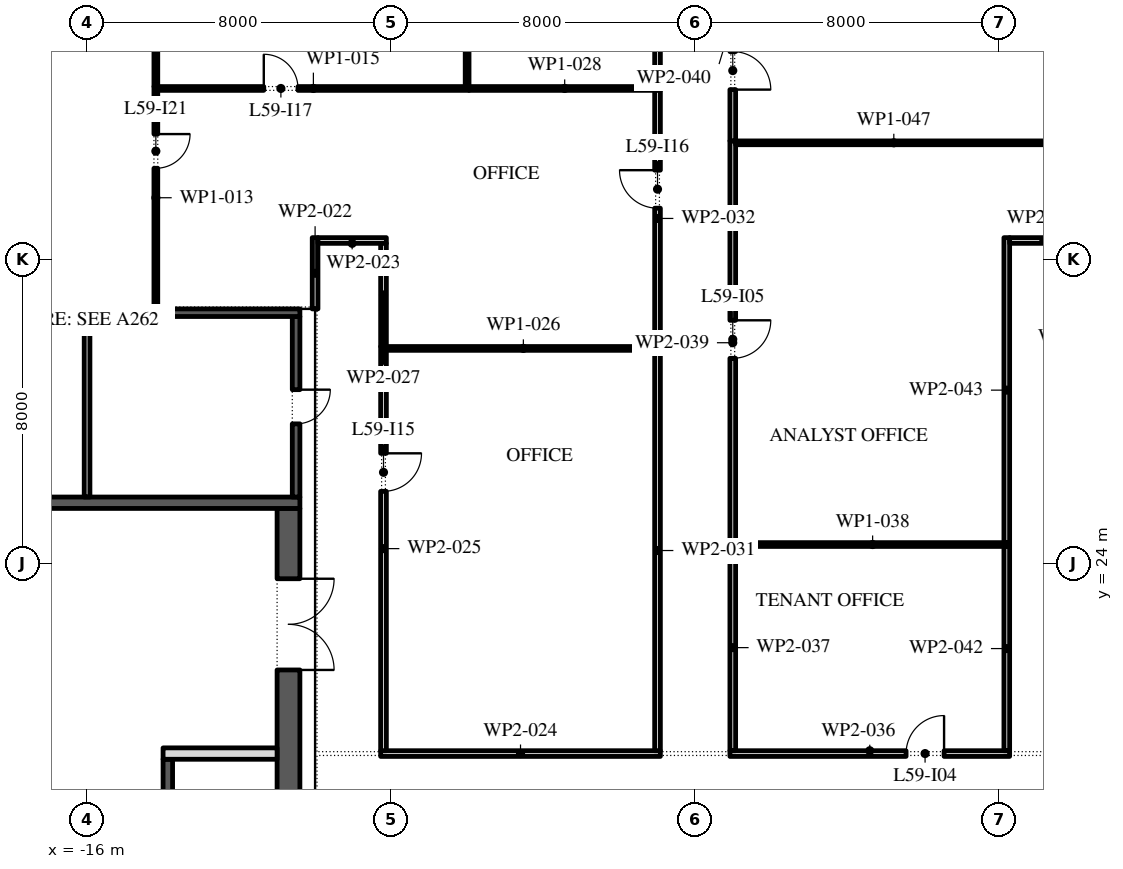
"""IFC4 building model, lengths in metres.
Left out: names, types, materials, properties, quantities, classifications, styles, units other than length and angle.
Written with IfcOpenShell. Run it as: python <this file> out.ifc"""

import sys

from ifc_helpers import new_model, si_unit, direction, frame, frame_2d, origin, place, context, subcontext, project, spatial, rectangle, extrude, element, fill, save


model = new_model("IFC4")
c1 = context("Model", 3, precision=1e-05, world=origin(), true_north=direction((0.0, 1.0)))
c2 = subcontext(c1, "Body", "Model", "MODEL_VIEW")
j1 = project(units=[si_unit("LENGTHUNIT", "METRE"), si_unit("PLANEANGLEUNIT", "RADIAN")], contexts=[c1])
p1 = place(None, origin())
s1 = spatial("IfcSite", under=j1, at=p1, CompositionType="ELEMENT")
p2 = place(p1, origin())
s2 = spatial("IfcBuilding", under=s1, at=p2, CompositionType="ELEMENT")
p3 = place(p2, frame((0.0, 0.0, 272.4)))
s3 = spatial("IfcBuildingStorey", under=s2, at=p3, CompositionType="ELEMENT", Elevation=272.4)
p4 = place(p3, frame((-10.7, -2.45, 0.0), z_axis=(0.0, 0.0, 1.0), x_axis=(0.0, 1.0, 0.0)))
e1 = element("IfcWall", 1, at=p4, inside=s3, PredefinedType="SHEAR", context=c2, shape_type="SweptSolid", body=[
    extrude(rectangle(XDim=27.9, YDim=0.6, at=frame_2d((13.95, 0.0))), origin(), (0.0, 0.0, 1.0), 4.0),
])
p5 = place(p4, frame((23.65, 0.0, 0.0)))
e2 = element("IfcOpeningElement", 2, at=p5, cuts=e1, PredefinedType="OPENING", context=c2, shape_type="SweptSolid", body=[
    extrude(rectangle(XDim=2.4, YDim=2.1, at=frame_2d((1.2, 1.05))), frame((0.0, 0.31, 0.0), z_axis=(0.0, -1.0, 0.0), x_axis=(1.0, 0.0, 0.0)), (0.0, 0.0, 1.0), 0.62),
])
p6 = place(p4, frame((1.087, 0.0, 0.0)))
e3 = element("IfcOpeningElement", 3, at=p6, cuts=e1, PredefinedType="OPENING", context=c2, shape_type="SweptSolid", body=[
    extrude(rectangle(XDim=0.9, YDim=2.1, at=frame_2d((0.45, 1.05))), frame((0.0, 0.31, 0.0), z_axis=(0.0, -1.0, 0.0), x_axis=(1.0, 0.0, 0.0)), (0.0, 0.0, 1.0), 0.62),
])
p7 = place(p4, frame((4.262, 0.0, 0.0)))
e4 = element("IfcOpeningElement", 4, at=p7, cuts=e1, PredefinedType="OPENING", context=c2, shape_type="SweptSolid", body=[
    extrude(rectangle(XDim=1.0, YDim=2.1, at=frame_2d((0.5, 1.05))), frame((0.0, 0.31, 0.0), z_axis=(0.0, -1.0, 0.0), x_axis=(1.0, 0.0, 0.0)), (0.0, 0.0, 1.0), 0.62),
])
p8 = place(p3, frame((-21.6, 25.6, 0.0), z_axis=(0.0, 0.0, 1.0), x_axis=(1.0, 0.0, 0.0)))
e5 = element("IfcWall", 5, at=p8, inside=s3, PredefinedType="SHEAR", context=c2, shape_type="SweptSolid", body=[
    extrude(rectangle(XDim=11.2, YDim=0.3, at=frame_2d((5.6, 0.0))), origin(), (0.0, 0.0, 1.0), 4.0),
])
p9 = place(p3, frame((-13.875, -2.45, 0.0), z_axis=(0.0, 0.0, 1.0), x_axis=(0.0, 1.0, 0.0)))
e6 = element("IfcWall", 6, at=p9, inside=s3, PredefinedType="SHEAR", context=c2, shape_type="SweptSolid", body=[
    extrude(rectangle(XDim=21.3, YDim=0.25, at=frame_2d((10.65, 0.0))), origin(), (0.0, 0.0, 1.0), 4.0),
])
p10 = place(p9, frame((16.261, 0.0, 0.0)))
e7 = element("IfcOpeningElement", 7, at=p10, cuts=e6, PredefinedType="OPENING", context=c2, shape_type="SweptSolid", body=[
    extrude(rectangle(XDim=0.9, YDim=2.1, at=frame_2d((0.45, 1.05))), frame((0.0, 0.135, 0.0), z_axis=(0.0, -1.0, 0.0), x_axis=(1.0, 0.0, 0.0)), (0.0, 0.0, 1.0), 0.27),
])
p11 = place(p9, frame((19.325, 0.0, 0.0)))
e8 = element("IfcOpeningElement", 8, at=p11, cuts=e6, PredefinedType="OPENING", context=c2, shape_type="SweptSolid", body=[
    extrude(rectangle(XDim=0.9, YDim=2.1, at=frame_2d((0.45, 1.05))), frame((0.0, 0.135, 0.0), z_axis=(0.0, -1.0, 0.0), x_axis=(1.0, 0.0, 0.0)), (0.0, 0.0, 1.0), 0.27),
])
p12 = place(p9, frame((6.971, 0.0, 0.0)))
e9 = element("IfcOpeningElement", 9, at=p12, cuts=e6, PredefinedType="OPENING", context=c2, shape_type="SweptSolid", body=[
    extrude(rectangle(XDim=1.1, YDim=2.1, at=frame_2d((0.55, 1.05))), frame((0.0, 0.135, 0.0), z_axis=(0.0, -1.0, 0.0), x_axis=(1.0, 0.0, 0.0)), (0.0, 0.0, 1.0), 0.27),
])
p13 = place(p9, frame((9.114, 0.0, 0.0)))
e10 = element("IfcOpeningElement", 10, at=p13, cuts=e6, PredefinedType="OPENING", context=c2, shape_type="SweptSolid", body=[
    extrude(rectangle(XDim=1.1, YDim=2.1, at=frame_2d((0.55, 1.05))), frame((0.0, 0.135, 0.0), z_axis=(0.0, -1.0, 0.0), x_axis=(1.0, 0.0, 0.0)), (0.0, 0.0, 1.0), 0.27),
])
p14 = place(p9, frame((11.257, 0.0, 0.0)))
e11 = element("IfcOpeningElement", 11, at=p14, cuts=e6, PredefinedType="OPENING", context=c2, shape_type="SweptSolid", body=[
    extrude(rectangle(XDim=1.1, YDim=2.1, at=frame_2d((0.55, 1.05))), frame((0.0, 0.135, 0.0), z_axis=(0.0, -1.0, 0.0), x_axis=(1.0, 0.0, 0.0)), (0.0, 0.0, 1.0), 0.27),
])
p15 = place(p9, frame((13.4, 0.0, 0.0)))
e12 = element("IfcOpeningElement", 12, at=p15, cuts=e6, PredefinedType="OPENING", context=c2, shape_type="SweptSolid", body=[
    extrude(rectangle(XDim=1.1, YDim=2.1, at=frame_2d((0.55, 1.05))), frame((0.0, 0.135, 0.0), z_axis=(0.0, -1.0, 0.0), x_axis=(1.0, 0.0, 0.0)), (0.0, 0.0, 1.0), 0.27),
])
p16 = place(p3, frame((-14.0, 19.0, 0.0), z_axis=(0.0, 0.0, 1.0), x_axis=(1.0, 0.0, 0.0)))
e13 = element("IfcWall", 13, at=p16, inside=s3, PredefinedType="PARTITIONING", context=c2, shape_type="SweptSolid", body=[
    extrude(rectangle(XDim=3.0, YDim=0.3, at=frame_2d((1.5, 0.0))), origin(), (0.0, 0.0, 1.0), 4.0),
])
p17 = place(p3, frame((-10.5, 25.75, 0.0), z_axis=(0.0, 0.0, 1.0), x_axis=(0.0, 1.0, 0.0)))
e14 = element("IfcWall", 14, at=p17, inside=s3, PredefinedType="SHEAR", context=c2, shape_type="SweptSolid", body=[
    extrude(rectangle(XDim=4.75, YDim=0.2, at=frame_2d((2.375, 0.0))), origin(), (0.0, 0.0, 1.0), 4.0),
])
p18 = place(p17, frame((1.925, 0.0, 0.0)))
e15 = element("IfcOpeningElement", 15, at=p18, cuts=e14, PredefinedType="OPENING", context=c2, shape_type="SweptSolid", body=[
    extrude(rectangle(XDim=0.9, YDim=2.1, at=frame_2d((0.45, 1.05))), frame((0.0, 0.11, 0.0), z_axis=(0.0, -1.0, 0.0), x_axis=(1.0, 0.0, 0.0)), (0.0, 0.0, 1.0), 0.22),
])
p19 = place(p3, frame((-21.6, 30.6, 0.0), z_axis=(0.0, 0.0, 1.0), x_axis=(1.0, 0.0, 0.0)))
e16 = element("IfcWall", 16, at=p19, inside=s3, PredefinedType="SHEAR", context=c2, shape_type="SweptSolid", body=[
    extrude(rectangle(XDim=11.2, YDim=0.2, at=frame_2d((5.6, 0.0))), origin(), (0.0, 0.0, 1.0), 4.0),
])
p20 = place(p3, frame((-16.0, 25.75, 0.0), z_axis=(0.0, 0.0, 1.0), x_axis=(0.0, 1.0, 0.0)))
e17 = element("IfcWall", 17, at=p20, inside=s3, PredefinedType="PARTITIONING", context=c2, shape_type="SweptSolid", body=[
    extrude(rectangle(XDim=4.75, YDim=0.15, at=frame_2d((2.375, 0.0))), origin(), (0.0, 0.0, 1.0), 4.0),
])
p21 = place(p3, frame((-14.19, 30.7, 0.0), z_axis=(0.0, 0.0, 1.0), x_axis=(0.0, 1.0, 0.0)))
e18 = element("IfcWall", 18, at=p21, inside=s3, PredefinedType="PARTITIONING", context=c2, shape_type="SweptSolid", body=[
    extrude(rectangle(XDim=5.85, YDim=0.1, at=frame_2d((2.925, 0.0))), origin(), (0.0, 0.0, 1.0), 4.0),
])
p22 = place(p21, frame((3.7, 0.0, 0.0)))
e19 = element("IfcOpeningElement", 19, at=p22, cuts=e18, PredefinedType="OPENING", context=c2, shape_type="SweptSolid", body=[
    extrude(rectangle(XDim=0.9, YDim=2.1, at=frame_2d((0.45, 1.05))), frame((0.0, 0.06, 0.0), z_axis=(0.0, -1.0, 0.0), x_axis=(1.0, 0.0, 0.0)), (0.0, 0.0, 1.0), 0.12),
])
p23 = place(p3, frame((-14.19, 36.55, 0.0), z_axis=(0.0, 0.0, 1.0), x_axis=(0.0, 1.0, 0.0)))
e20 = element("IfcWall", 20, at=p23, inside=s3, PredefinedType="PARTITIONING", context=c2, shape_type="SweptSolid", body=[
    extrude(rectangle(XDim=5.5, YDim=0.1, at=frame_2d((2.75, 0.0))), origin(), (0.0, 0.0, 1.0), 4.0),
])
p24 = place(p3, frame((-14.14, 36.5, 0.0), z_axis=(0.0, 0.0, 1.0), x_axis=(1.0, 0.0, 0.0)))
e21 = element("IfcWall", 21, at=p24, inside=s3, PredefinedType="PARTITIONING", context=c2, shape_type="SweptSolid", body=[
    extrude(rectangle(XDim=8.19, YDim=0.1, at=frame_2d((4.095, 0.0))), origin(), (0.0, 0.0, 1.0), 4.0),
])
p25 = place(p24, frame((2.79, 0.0, 0.0)))
e22 = element("IfcOpeningElement", 22, at=p25, cuts=e21, PredefinedType="OPENING", context=c2, shape_type="SweptSolid", body=[
    extrude(rectangle(XDim=0.9, YDim=2.1, at=frame_2d((0.45, 1.05))), frame((0.0, 0.06, 0.0), z_axis=(0.0, -1.0, 0.0), x_axis=(1.0, 0.0, 0.0)), (0.0, 0.0, 1.0), 0.12),
])
p26 = place(p3, frame((-10.0, 30.7, 0.0), z_axis=(0.0, 0.0, 1.0), x_axis=(0.0, 1.0, 0.0)))
e23 = element("IfcWall", 23, at=p26, inside=s3, PredefinedType="PARTITIONING", context=c2, shape_type="SweptSolid", body=[
    extrude(rectangle(XDim=1.875, YDim=0.15, at=frame_2d((0.938, 0.0))), origin(), (0.0, 0.0, 1.0), 4.0),
])
p27 = place(p3, frame((-9.925, 32.5, 0.0), z_axis=(0.0, 0.0, 1.0), x_axis=(1.0, 0.0, 0.0)))
e24 = element("IfcWall", 24, at=p27, inside=s3, PredefinedType="PARTITIONING", context=c2, shape_type="SweptSolid", body=[
    extrude(rectangle(XDim=1.8, YDim=0.15, at=frame_2d((0.9, 0.0))), origin(), (0.0, 0.0, 1.0), 4.0),
])
p28 = place(p3, frame((-8.275, 19.0, 0.0), z_axis=(0.0, 0.0, 1.0), x_axis=(1.0, 0.0, 0.0)))
e25 = element("IfcWall", 25, at=p28, inside=s3, PredefinedType="PARTITIONING", context=c2, shape_type="SweptSolid", body=[
    extrude(rectangle(XDim=7.36, YDim=0.15, at=frame_2d((3.68, 0.0))), origin(), (0.0, 0.0, 1.0), 4.0),
])
p29 = place(p3, frame((-8.2, 29.71, 0.0), z_axis=(0.0, 0.0, 1.0), x_axis=(0.0, -1.0, 0.0)))
e26 = element("IfcWall", 26, at=p29, inside=s3, PredefinedType="PARTITIONING", context=c2, shape_type="SweptSolid", body=[
    extrude(rectangle(XDim=10.635, YDim=0.15, at=frame_2d((5.317, 0.0))), origin(), (0.0, 0.0, 1.0), 4.0),
])
p30 = place(p29, frame((2.81, 0.0, 0.0)))
e27 = element("IfcOpeningElement", 27, at=p30, cuts=e26, PredefinedType="OPENING", context=c2, shape_type="SweptSolid", body=[
    extrude(rectangle(XDim=1.0, YDim=2.1, at=frame_2d((0.5, 1.05))), frame((0.0, 0.085, 0.0), z_axis=(0.0, -1.0, 0.0), x_axis=(1.0, 0.0, 0.0)), (0.0, 0.0, 1.0), 0.17),
])
p31 = place(p3, frame((-8.125, 29.66, 0.0), z_axis=(0.0, 0.0, 1.0), x_axis=(1.0, 0.0, 0.0)))
e28 = element("IfcWall", 28, at=p31, inside=s3, PredefinedType="PARTITIONING", context=c2, shape_type="SweptSolid", body=[
    extrude(rectangle(XDim=7.21, YDim=0.1, at=frame_2d((3.605, 0.0))), origin(), (0.0, 0.0, 1.0), 4.0),
])
p32 = place(p3, frame((-8.2, 32.425, 0.0), z_axis=(0.0, 0.0, 1.0), x_axis=(0.0, -1.0, 0.0)))
e29 = element("IfcWall", 29, at=p32, inside=s3, PredefinedType="PARTITIONING", context=c2, shape_type="SweptSolid", body=[
    extrude(rectangle(XDim=2.715, YDim=0.15, at=frame_2d((1.357, 0.0))), origin(), (0.0, 0.0, 1.0), 4.0),
])
p33 = place(p3, frame((-5.95, 36.5, 0.0), z_axis=(0.0, 0.0, 1.0), x_axis=(1.0, 0.0, 0.0)))
e30 = element("IfcWall", 30, at=p33, inside=s3, PredefinedType="PARTITIONING", context=c2, shape_type="SweptSolid", body=[
    extrude(rectangle(XDim=5.035, YDim=0.1, at=frame_2d((2.518, 0.0))), origin(), (0.0, 0.0, 1.0), 4.0),
])
p34 = place(p3, frame((-6.0, 43.45, 0.0), z_axis=(0.0, 0.0, 1.0), x_axis=(0.0, -1.0, 0.0)))
e31 = element("IfcWall", 31, at=p34, inside=s3, PredefinedType="PARTITIONING", context=c2, shape_type="SweptSolid", body=[
    extrude(rectangle(XDim=6.9, YDim=0.1, at=frame_2d((3.45, 0.0))), origin(), (0.0, 0.0, 1.0), 4.0),
])
p35 = place(p3, frame((-0.99, 19.075, 0.0), z_axis=(0.0, 0.0, 1.0), x_axis=(0.0, 1.0, 0.0)))
e32 = element("IfcWall", 32, at=p35, inside=s3, PredefinedType="PARTITIONING", context=c2, shape_type="SweptSolid", body=[
    extrude(rectangle(XDim=10.535, YDim=0.15, at=frame_2d((5.268, 0.0))), origin(), (0.0, 0.0, 1.0), 4.0),
])
p36 = place(p3, frame((-0.99, 29.71, 0.0), z_axis=(0.0, 0.0, 1.0), x_axis=(0.0, 1.0, 0.0)))
e33 = element("IfcWall", 33, at=p36, inside=s3, PredefinedType="PARTITIONING", context=c2, shape_type="SweptSolid", body=[
    extrude(rectangle(XDim=6.74, YDim=0.15, at=frame_2d((3.37, 0.0))), origin(), (0.0, 0.0, 1.0), 4.0),
])
p37 = place(p36, frame((3.64, 0.0, 0.0)))
e34 = element("IfcOpeningElement", 34, at=p37, cuts=e33, PredefinedType="OPENING", context=c2, shape_type="SweptSolid", body=[
    extrude(rectangle(XDim=1.0, YDim=2.1, at=frame_2d((0.5, 1.05))), frame((0.0, 0.085, 0.0), z_axis=(0.0, -1.0, 0.0), x_axis=(1.0, 0.0, 0.0)), (0.0, 0.0, 1.0), 0.17),
])
p38 = place(p3, frame((-0.99, 36.55, 0.0), z_axis=(0.0, 0.0, 1.0), x_axis=(0.0, 1.0, 0.0)))
e35 = element("IfcWall", 35, at=p38, inside=s3, PredefinedType="PARTITIONING", context=c2, shape_type="SweptSolid", body=[
    extrude(rectangle(XDim=6.9, YDim=0.15, at=frame_2d((3.45, 0.0))), origin(), (0.0, 0.0, 1.0), 4.0),
])
p39 = place(p38, frame((4.3, 0.0, 0.0)))
e36 = element("IfcOpeningElement", 36, at=p39, cuts=e35, PredefinedType="OPENING", context=c2, shape_type="SweptSolid", body=[
    extrude(rectangle(XDim=1.0, YDim=2.1, at=frame_2d((0.5, 1.05))), frame((0.0, 0.085, 0.0), z_axis=(0.0, -1.0, 0.0), x_axis=(1.0, 0.0, 0.0)), (0.0, 0.0, 1.0), 0.17),
])
p40 = place(p3, frame((0.915, 19.0, 0.0), z_axis=(0.0, 0.0, 1.0), x_axis=(1.0, 0.0, 0.0)))
e37 = element("IfcWall", 37, at=p40, inside=s3, PredefinedType="PARTITIONING", context=c2, shape_type="SweptSolid", body=[
    extrude(rectangle(XDim=7.36, YDim=0.15, at=frame_2d((3.68, 0.0))), origin(), (0.0, 0.0, 1.0), 4.0),
])
p41 = place(p40, frame((4.635, 0.0, 0.0)))
e38 = element("IfcOpeningElement", 38, at=p41, cuts=e37, PredefinedType="OPENING", context=c2, shape_type="SweptSolid", body=[
    extrude(rectangle(XDim=1.0, YDim=2.1, at=frame_2d((0.5, 1.05))), frame((0.0, 0.085, 0.0), z_axis=(0.0, -1.0, 0.0), x_axis=(1.0, 0.0, 0.0)), (0.0, 0.0, 1.0), 0.17),
])
p42 = place(p3, frame((0.99, 24.5, 0.0), z_axis=(0.0, 0.0, 1.0), x_axis=(0.0, -1.0, 0.0)))
e39 = element("IfcWall", 39, at=p42, inside=s3, PredefinedType="PARTITIONING", context=c2, shape_type="SweptSolid", body=[
    extrude(rectangle(XDim=5.425, YDim=0.15, at=frame_2d((2.712, 0.0))), origin(), (0.0, 0.0, 1.0), 4.0),
])
p43 = place(p3, frame((1.065, 24.5, 0.0), z_axis=(0.0, 0.0, 1.0), x_axis=(1.0, 0.0, 0.0)))
e40 = element("IfcWall", 40, at=p43, inside=s3, PredefinedType="PARTITIONING", context=c2, shape_type="SweptSolid", body=[
    extrude(rectangle(XDim=7.21, YDim=0.1, at=frame_2d((3.605, 0.0))), origin(), (0.0, 0.0, 1.0), 4.0),
])
p44 = place(p3, frame((0.99, 35.12, 0.0), z_axis=(0.0, 0.0, 1.0), x_axis=(0.0, -1.0, 0.0)))
e41 = element("IfcWall", 41, at=p44, inside=s3, PredefinedType="PARTITIONING", context=c2, shape_type="SweptSolid", body=[
    extrude(rectangle(XDim=10.62, YDim=0.15, at=frame_2d((5.31, 0.0))), origin(), (0.0, 0.0, 1.0), 4.0),
])
p45 = place(p44, frame((4.72, 0.0, 0.0)))
e42 = element("IfcOpeningElement", 42, at=p45, cuts=e41, PredefinedType="OPENING", context=c2, shape_type="SweptSolid", body=[
    extrude(rectangle(XDim=1.0, YDim=2.1, at=frame_2d((0.5, 1.05))), frame((0.0, 0.085, 0.0), z_axis=(0.0, -1.0, 0.0), x_axis=(1.0, 0.0, 0.0)), (0.0, 0.0, 1.0), 0.17),
])
p46 = place(p3, frame((0.99, 41.55, 0.0), z_axis=(0.0, 0.0, 1.0), x_axis=(0.0, -1.0, 0.0)))
e43 = element("IfcWall", 43, at=p46, inside=s3, PredefinedType="PARTITIONING", context=c2, shape_type="SweptSolid", body=[
    extrude(rectangle(XDim=6.43, YDim=0.15, at=frame_2d((3.215, 0.0))), origin(), (0.0, 0.0, 1.0), 4.0),
])
p47 = place(p46, frame((4.08, 0.0, 0.0)))
e44 = element("IfcOpeningElement", 44, at=p47, cuts=e43, PredefinedType="OPENING", context=c2, shape_type="SweptSolid", body=[
    extrude(rectangle(XDim=1.0, YDim=2.1, at=frame_2d((0.5, 1.05))), frame((0.0, 0.085, 0.0), z_axis=(0.0, -1.0, 0.0), x_axis=(1.0, 0.0, 0.0)), (0.0, 0.0, 1.0), 0.17),
])
p48 = place(p3, frame((8.2, 19.075, 0.0), z_axis=(0.0, 0.0, 1.0), x_axis=(0.0, 1.0, 0.0)))
e45 = element("IfcWall", 45, at=p48, inside=s3, PredefinedType="PARTITIONING", context=c2, shape_type="SweptSolid", body=[
    extrude(rectangle(XDim=5.375, YDim=0.15, at=frame_2d((2.688, 0.0))), origin(), (0.0, 0.0, 1.0), 4.0),
])
p49 = place(p3, frame((8.2, 24.55, 0.0), z_axis=(0.0, 0.0, 1.0), x_axis=(0.0, 1.0, 0.0)))
e46 = element("IfcWall", 46, at=p49, inside=s3, PredefinedType="PARTITIONING", context=c2, shape_type="SweptSolid", body=[
    extrude(rectangle(XDim=8.025, YDim=0.15, at=frame_2d((4.012, 0.0))), origin(), (0.0, 0.0, 1.0), 4.0),
])
p50 = place(p3, frame((8.275, 32.5, 0.0), z_axis=(0.0, 0.0, 1.0), x_axis=(1.0, 0.0, 0.0)))
e47 = element("IfcWall", 47, at=p50, inside=s3, PredefinedType="PARTITIONING", context=c2, shape_type="SweptSolid", body=[
    extrude(rectangle(XDim=1.8, YDim=0.15, at=frame_2d((0.9, 0.0))), origin(), (0.0, 0.0, 1.0), 4.0),
])
p51 = place(p3, frame((9.39, 35.07, 0.0), z_axis=(0.0, 0.0, 1.0), x_axis=(-1.0, 0.0, 0.0)))
e48 = element("IfcWall", 48, at=p51, inside=s3, PredefinedType="PARTITIONING", context=c2, shape_type="SweptSolid", body=[
    extrude(rectangle(XDim=8.325, YDim=0.1, at=frame_2d((4.163, 0.0))), origin(), (0.0, 0.0, 1.0), 4.0),
])
p52 = place(p5, frame((2.4, 0.0, 0.0), z_axis=(0.0, 0.0, 1.0), x_axis=(-1.0, 0.0, 0.0)))
e49 = element("IfcDoor", 49, at=p52, inside=s3, OperationType="DOUBLE_DOOR_SINGLE_SWING", PredefinedType="DOOR", context=c2, shape_type="SweptSolid", body=[
    extrude(rectangle(XDim=2.4, YDim=2.1, at=frame_2d((1.2, 1.05))), frame((0.0, 0.025, 0.0), z_axis=(0.0, -1.0, 0.0), x_axis=(1.0, 0.0, 0.0)), (0.0, 0.0, 1.0), 0.05),
])
fill(e2, e49)
p53 = place(p18, frame((0.9, 0.15, 0.0), z_axis=(0.0, 0.0, 1.0), x_axis=(-1.0, 0.0, 0.0)))
e50 = element("IfcDoor", 50, at=p53, inside=s3, OperationType="SINGLE_SWING_RIGHT", PredefinedType="DOOR", context=c2, shape_type="SweptSolid", body=[
    extrude(rectangle(XDim=0.9, YDim=2.1, at=frame_2d((0.45, 1.05))), frame((0.0, 0.1, 0.0), z_axis=(0.0, -1.0, 0.0), x_axis=(1.0, 0.0, 0.0)), (0.0, 0.0, 1.0), 0.05),
])
fill(e15, e50)
p54 = place(p47, origin())
e51 = element("IfcDoor", 51, at=p54, inside=s3, OperationType="SINGLE_SWING_LEFT", PredefinedType="DOOR", context=c2, shape_type="SweptSolid", body=[
    extrude(rectangle(XDim=1.0, YDim=2.1, at=frame_2d((0.5, 1.05))), frame((0.0, 0.025, 0.0), z_axis=(0.0, -1.0, 0.0), x_axis=(1.0, 0.0, 0.0)), (0.0, 0.0, 1.0), 0.05),
])
fill(e44, e51)
p55 = place(p41, origin())
e52 = element("IfcDoor", 52, at=p55, inside=s3, OperationType="SINGLE_SWING_LEFT", PredefinedType="DOOR", context=c2, shape_type="SweptSolid", body=[
    extrude(rectangle(XDim=1.0, YDim=2.1, at=frame_2d((0.5, 1.05))), frame((0.0, 0.025, 0.0), z_axis=(0.0, -1.0, 0.0), x_axis=(1.0, 0.0, 0.0)), (0.0, 0.0, 1.0), 0.05),
])
fill(e38, e52)
p56 = place(p45, origin())
e53 = element("IfcDoor", 53, at=p56, inside=s3, OperationType="SINGLE_SWING_RIGHT", PredefinedType="DOOR", context=c2, shape_type="SweptSolid", body=[
    extrude(rectangle(XDim=1.0, YDim=2.1, at=frame_2d((0.5, 1.05))), frame((0.0, 0.025, 0.0), z_axis=(0.0, -1.0, 0.0), x_axis=(1.0, 0.0, 0.0)), (0.0, 0.0, 1.0), 0.05),
])
fill(e42, e53)
p57 = place(p30, origin())
e54 = element("IfcDoor", 54, at=p57, inside=s3, OperationType="SINGLE_SWING_RIGHT", PredefinedType="DOOR", context=c2, shape_type="SweptSolid", body=[
    extrude(rectangle(XDim=1.0, YDim=2.1, at=frame_2d((0.5, 1.05))), frame((0.0, 0.025, 0.0), z_axis=(0.0, -1.0, 0.0), x_axis=(1.0, 0.0, 0.0)), (0.0, 0.0, 1.0), 0.05),
])
fill(e27, e54)
p58 = place(p37, origin())
e55 = element("IfcDoor", 55, at=p58, inside=s3, OperationType="SINGLE_SWING_LEFT", PredefinedType="DOOR", context=c2, shape_type="SweptSolid", body=[
    extrude(rectangle(XDim=1.0, YDim=2.1, at=frame_2d((0.5, 1.05))), frame((0.0, 0.025, 0.0), z_axis=(0.0, -1.0, 0.0), x_axis=(1.0, 0.0, 0.0)), (0.0, 0.0, 1.0), 0.05),
])
fill(e34, e55)
p59 = place(p25, origin())
e56 = element("IfcDoor", 56, at=p59, inside=s3, OperationType="SINGLE_SWING_RIGHT", PredefinedType="DOOR", context=c2, shape_type="SweptSolid", body=[
    extrude(rectangle(XDim=0.9, YDim=2.1, at=frame_2d((0.45, 1.05))), frame((0.0, 0.025, 0.0), z_axis=(0.0, -1.0, 0.0), x_axis=(1.0, 0.0, 0.0)), (0.0, 0.0, 1.0), 0.05),
])
fill(e22, e56)
p60 = place(p22, frame((0.9, 0.0, 0.0), z_axis=(0.0, 0.0, 1.0), x_axis=(-1.0, 0.0, 0.0)))
e57 = element("IfcDoor", 57, at=p60, inside=s3, OperationType="SINGLE_SWING_RIGHT", PredefinedType="DOOR", context=c2, shape_type="SweptSolid", body=[
    extrude(rectangle(XDim=0.9, YDim=2.1, at=frame_2d((0.45, 1.05))), frame((0.0, 0.025, 0.0), z_axis=(0.0, -1.0, 0.0), x_axis=(1.0, 0.0, 0.0)), (0.0, 0.0, 1.0), 0.05),
])
fill(e19, e57)
save(model, sys.argv[1])
